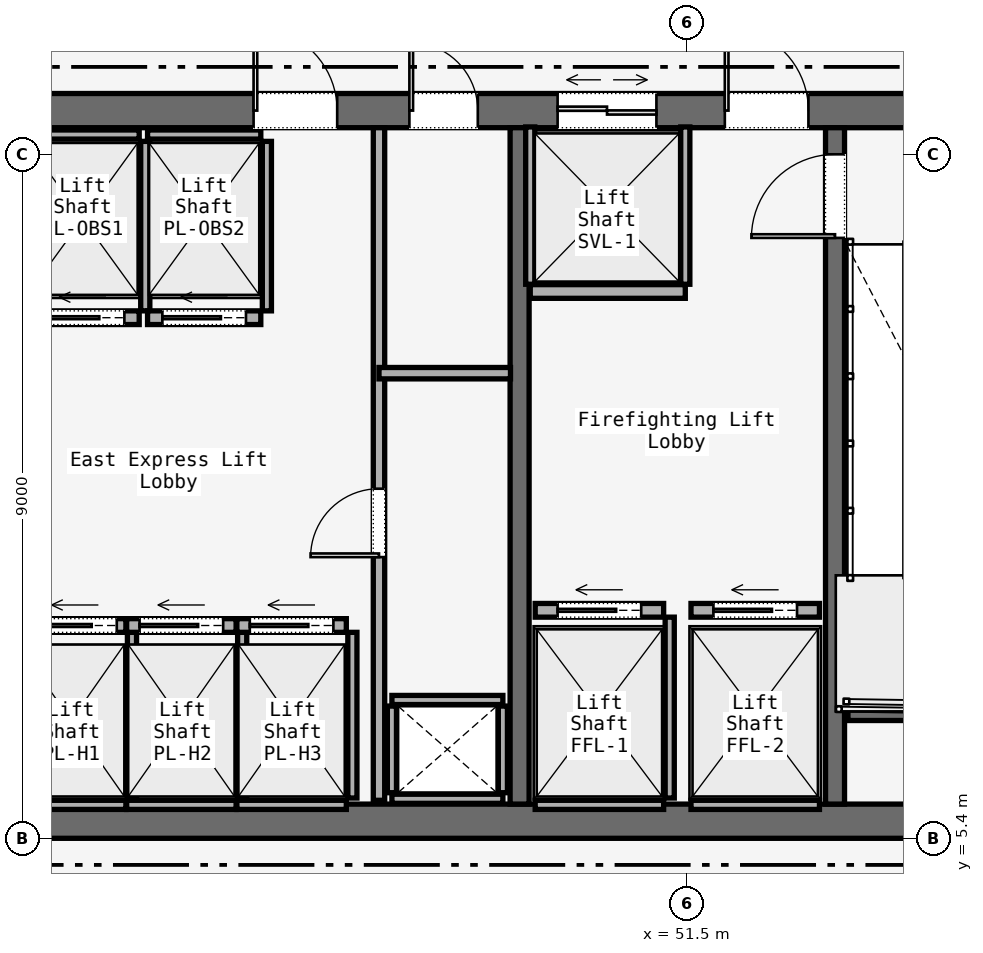
"""IFC4 building model, lengths in metres.
Left out: names, types, materials, properties, quantities, classifications, styles, units other than length and angle.
Written with IfcOpenShell. Run it as: python <this file> out.ifc"""

import sys

from ifc_helpers import new_model, si_unit, direction, frame, frame_2d, origin, place, context, subcontext, project, spatial, rectangle, extrude, element, fill, save


model = new_model("IFC4")
c1 = context("Model", 3, precision=1e-05, world=origin(), true_north=direction((0.0, 1.0)))
c2 = subcontext(c1, "Body", "Model", "MODEL_VIEW")
j1 = project(units=[si_unit("LENGTHUNIT", "METRE"), si_unit("PLANEANGLEUNIT", "RADIAN")], contexts=[c1])
p1 = place(None, origin())
s1 = spatial("IfcSite", under=j1, at=p1, CompositionType="ELEMENT")
p2 = place(p1, origin())
s2 = spatial("IfcBuilding", under=s1, at=p2, CompositionType="ELEMENT")
p3 = place(p2, origin())
s3 = spatial("IfcBuildingStorey", under=s2, at=p3, CompositionType="ELEMENT", Elevation=0.0)
p4 = place(p3, frame((26.45, 14.975, 0.0), z_axis=(0.0, 0.0, 1.0), x_axis=(1.0, 0.0, 0.0)))
e1 = element("IfcWall", 1, at=p4, inside=s3, PredefinedType="SOLIDWALL", context=c2, shape_type="SweptSolid", body=[
    extrude(rectangle(XDim=31.1, YDim=0.45, at=frame_2d((15.55, 0.0))), origin(), (0.0, 0.0, 1.0), 5.7),
])
p5 = place(p4, frame((1.65, 0.0, 0.0)))
e2 = element("IfcOpeningElement", 2, at=p5, cuts=e1, PredefinedType="OPENING", context=c2, shape_type="SweptSolid", body=[
    extrude(rectangle(XDim=1.1, YDim=2.2, at=frame_2d((0.55, 1.1))), frame((0.0, 0.225, 0.0), z_axis=(0.0, -1.0, 0.0), x_axis=(1.0, 0.0, 0.0)), (0.0, 0.0, 1.0), 0.45),
])
p6 = place(p4, frame((13.65, 0.0, 0.0)))
e3 = element("IfcOpeningElement", 3, at=p6, cuts=e1, PredefinedType="OPENING", context=c2, shape_type="SweptSolid", body=[
    extrude(rectangle(XDim=1.1, YDim=2.2, at=frame_2d((0.55, 1.1))), frame((0.0, 0.225, 0.0), z_axis=(0.0, -1.0, 0.0), x_axis=(1.0, 0.0, 0.0)), (0.0, 0.0, 1.0), 0.45),
])
p7 = place(p4, frame((25.55, 0.0, 0.0)))
e4 = element("IfcOpeningElement", 4, at=p7, cuts=e1, PredefinedType="OPENING", context=c2, shape_type="SweptSolid", body=[
    extrude(rectangle(XDim=1.1, YDim=2.2, at=frame_2d((0.55, 1.1))), frame((0.0, 0.225, 0.0), z_axis=(0.0, -1.0, 0.0), x_axis=(1.0, 0.0, 0.0)), (0.0, 0.0, 1.0), 0.45),
])
p8 = place(p4, frame((10.7, 0.0, 0.0)))
e5 = element("IfcOpeningElement", 5, at=p8, cuts=e1, PredefinedType="OPENING", context=c2, shape_type="SweptSolid", body=[
    extrude(rectangle(XDim=1.4, YDim=2.2, at=frame_2d((0.7, 1.1))), frame((0.0, 0.225, 0.0), z_axis=(0.0, -1.0, 0.0), x_axis=(1.0, 0.0, 0.0)), (0.0, 0.0, 1.0), 0.45),
])
p9 = place(p4, frame((19.35, 0.0, 0.0)))
e6 = element("IfcOpeningElement", 6, at=p9, cuts=e1, PredefinedType="OPENING", context=c2, shape_type="SweptSolid", body=[
    extrude(rectangle(XDim=1.1, YDim=2.2, at=frame_2d((0.55, 1.1))), frame((0.0, 0.225, 0.0), z_axis=(0.0, -1.0, 0.0), x_axis=(1.0, 0.0, 0.0)), (0.0, 0.0, 1.0), 0.45),
])
p10 = place(p4, frame((21.4, 0.0, 0.0)))
e7 = element("IfcOpeningElement", 7, at=p10, cuts=e1, PredefinedType="OPENING", context=c2, shape_type="SweptSolid", body=[
    extrude(rectangle(XDim=0.9, YDim=2.1, at=frame_2d((0.45, 1.05))), frame((0.0, 0.225, 0.0), z_axis=(0.0, -1.0, 0.0), x_axis=(1.0, 0.0, 0.0)), (0.0, 0.0, 1.0), 0.45),
])
p11 = place(p4, frame((23.35, 0.0, 0.0)))
e8 = element("IfcOpeningElement", 8, at=p11, cuts=e1, PredefinedType="OPENING", context=c2, shape_type="SweptSolid", body=[
    extrude(rectangle(XDim=1.3, YDim=2.3, at=frame_2d((0.65, 1.15))), frame((0.0, 0.225, 0.0), z_axis=(0.0, -1.0, 0.0), x_axis=(1.0, 0.0, 0.0)), (0.0, 0.0, 1.0), 0.45),
])
p12 = place(p3, frame((26.45, 5.625, 0.0), z_axis=(0.0, 0.0, 1.0), x_axis=(1.0, 0.0, 0.0)))
e9 = element("IfcWall", 9, at=p12, inside=s3, PredefinedType="SOLIDWALL", context=c2, shape_type="SweptSolid", body=[
    extrude(rectangle(XDim=31.1, YDim=0.45, at=frame_2d((15.55, 0.0))), origin(), (0.0, 0.0, 1.0), 5.7),
])
p13 = place(p3, frame((49.3, 5.85, 0.0), z_axis=(0.0, 0.0, 1.0), x_axis=(0.0, 1.0, 0.0)))
e10 = element("IfcWall", 10, at=p13, inside=s3, PredefinedType="SOLIDWALL", context=c2, shape_type="SweptSolid", body=[
    extrude(rectangle(XDim=8.9, YDim=0.25, at=frame_2d((4.45, 0.0))), origin(), (0.0, 0.0, 1.0), 5.7),
])
p14 = place(p3, frame((53.45, 5.85, 0.0), z_axis=(0.0, 0.0, 1.0), x_axis=(0.0, 1.0, 0.0)))
e11 = element("IfcWall", 11, at=p14, inside=s3, PredefinedType="SOLIDWALL", context=c2, shape_type="SweptSolid", body=[
    extrude(rectangle(XDim=8.9, YDim=0.25, at=frame_2d((4.45, 0.0))), origin(), (0.0, 0.0, 1.0), 5.7),
])
p15 = place(p14, frame((7.45, 0.0, 0.0)))
e12 = element("IfcOpeningElement", 12, at=p15, cuts=e11, PredefinedType="OPENING", context=c2, shape_type="SweptSolid", body=[
    extrude(rectangle(XDim=1.1, YDim=2.2, at=frame_2d((0.55, 1.1))), frame((0.0, 0.125, 0.0), z_axis=(0.0, -1.0, 0.0), x_axis=(1.0, 0.0, 0.0)), (0.0, 0.0, 1.0), 0.25),
])
p16 = place(p3, frame((53.62, 7.05, 0.0), z_axis=(0.0, 0.0, 1.0), x_axis=(1.0, 0.0, 0.0)))
e13 = element("IfcWall", 13, at=p16, inside=s3, PredefinedType="SOLIDWALL", context=c2, shape_type="SweptSolid", body=[
    extrude(rectangle(XDim=3.115, YDim=0.2, at=frame_2d((1.558, 0.0))), origin(), (0.0, 0.0, 1.0), 6.0),
])
for number, where, z_axis, x_axis in (
    (14, (47.62, 5.92, 0.0), (0.0, 0.0, 1.0), (1.0, 0.0, 0.0)),
    (15, (47.62, 7.22, 0.0), (0.0, 0.0, 1.0), (1.0, 0.0, 0.0)),
):
    element("IfcWall", number, at=place(p3, frame(where, z_axis=z_axis, x_axis=x_axis)), inside=s3, PredefinedType="SOLIDWALL", context=c2, shape_type="SweptSolid", body=[
        extrude(rectangle(XDim=1.46, YDim=0.12, at=frame_2d((0.73, 0.0))), origin(), (0.0, 0.0, 1.0), 3.6),
    ])
for number, where, z_axis, x_axis in (
    (16, (47.62, 6.0, 0.0), (0.0, 0.0, 1.0), (0.0, 1.0, 0.0)),
    (17, (49.08, 6.0, 0.0), (0.0, 0.0, 1.0), (0.0, 1.0, 0.0)),
):
    element("IfcWall", number, at=place(p3, frame(where, z_axis=z_axis, x_axis=x_axis)), inside=s3, PredefinedType="SOLIDWALL", context=c2, shape_type="SweptSolid", body=[
        extrude(rectangle(XDim=1.14, YDim=0.12, at=frame_2d((0.57, 0.0))), origin(), (0.0, 0.0, 1.0), 3.6),
    ])
p17 = place(p3, frame((47.45, 5.9, 0.0), z_axis=(0.0, 0.0, 1.0), x_axis=(0.0, 1.0, 0.0)))
e18 = element("IfcWall", 18, at=p17, inside=s3, PredefinedType="PARTITIONING", context=c2, shape_type="SweptSolid", body=[
    extrude(rectangle(XDim=8.85, YDim=0.15, at=frame_2d((4.425, 0.0))), origin(), (0.0, 0.0, 1.0), 3.6),
])
p18 = place(p17, frame((3.2, 0.0, 0.0)))
e19 = element("IfcOpeningElement", 19, at=p18, cuts=e18, PredefinedType="OPENING", context=c2, shape_type="SweptSolid", body=[
    extrude(rectangle(XDim=0.9, YDim=2.1, at=frame_2d((0.45, 1.05))), frame((0.0, 0.075, 0.0), z_axis=(0.0, -1.0, 0.0), x_axis=(1.0, 0.0, 0.0)), (0.0, 0.0, 1.0), 0.15),
])
p19 = place(p3, frame((47.45, 11.52, 0.0), z_axis=(0.0, 0.0, 1.0), x_axis=(1.0, 0.0, 0.0)))
e20 = element("IfcWall", 20, at=p19, inside=s3, PredefinedType="PARTITIONING", context=c2, shape_type="SweptSolid", body=[
    extrude(rectangle(XDim=1.73, YDim=0.15, at=frame_2d((0.865, 0.0))), origin(), (0.0, 0.0, 1.0), 3.6),
])
p20 = place(p3, frame((42.78, 8.2, 0.0), z_axis=(0.0, 0.0, 1.0), x_axis=(1.0, 0.0, 0.0)))
e21 = element("IfcWall", 21, at=p20, inside=s3, PredefinedType="SOLIDWALL", context=c2, shape_type="SweptSolid", body=[
    extrude(rectangle(XDim=1.34, YDim=0.18, at=frame_2d((0.67, 0.0))), origin(), (0.0, 0.0, 1.0), 3.6),
])
p21 = place(p20, frame((0.12, 0.0, 0.0)))
e22 = element("IfcOpeningElement", 22, at=p21, cuts=e21, PredefinedType="OPENING", context=c2, shape_type="SweptSolid", body=[
    extrude(rectangle(XDim=1.1, YDim=2.2, at=frame_2d((0.55, 1.1))), frame((0.0, 0.09, 0.0), z_axis=(0.0, -1.0, 0.0), x_axis=(1.0, 0.0, 0.0)), (0.0, 0.0, 1.0), 0.18),
])
p22 = place(p3, frame((42.78, 5.84, 0.0), z_axis=(0.0, 0.0, 1.0), x_axis=(1.0, 0.0, 0.0)))
e23 = element("IfcWall", 23, at=p22, inside=s3, PredefinedType="SOLIDWALL", context=c2, shape_type="SweptSolid", body=[
    extrude(rectangle(XDim=1.34, YDim=0.12, at=frame_2d((0.67, 0.0))), origin(), (0.0, 0.0, 1.0), 3.6),
])
p23 = place(p3, frame((44.2, 5.93, 0.0), z_axis=(0.0, 0.0, 1.0), x_axis=(0.0, 1.0, 0.0)))
e24 = element("IfcWall", 24, at=p23, inside=s3, PredefinedType="SOLIDWALL", context=c2, shape_type="SweptSolid", body=[
    extrude(rectangle(XDim=2.18, YDim=0.12, at=frame_2d((1.09, 0.0))), origin(), (0.0, 0.0, 1.0), 3.6),
])
p24 = place(p3, frame((44.13, 8.2, 0.0), z_axis=(0.0, 0.0, 1.0), x_axis=(1.0, 0.0, 0.0)))
e25 = element("IfcWall", 25, at=p24, inside=s3, PredefinedType="SOLIDWALL", context=c2, shape_type="SweptSolid", body=[
    extrude(rectangle(XDim=1.44, YDim=0.18, at=frame_2d((0.72, 0.0))), origin(), (0.0, 0.0, 1.0), 3.6),
])
p25 = place(p24, frame((0.17, 0.0, 0.0)))
e26 = element("IfcOpeningElement", 26, at=p25, cuts=e25, PredefinedType="OPENING", context=c2, shape_type="SweptSolid", body=[
    extrude(rectangle(XDim=1.1, YDim=2.2, at=frame_2d((0.55, 1.1))), frame((0.0, 0.09, 0.0), z_axis=(0.0, -1.0, 0.0), x_axis=(1.0, 0.0, 0.0)), (0.0, 0.0, 1.0), 0.18),
])
p26 = place(p3, frame((44.13, 5.84, 0.0), z_axis=(0.0, 0.0, 1.0), x_axis=(1.0, 0.0, 0.0)))
e27 = element("IfcWall", 27, at=p26, inside=s3, PredefinedType="SOLIDWALL", context=c2, shape_type="SweptSolid", body=[
    extrude(rectangle(XDim=1.44, YDim=0.12, at=frame_2d((0.72, 0.0))), origin(), (0.0, 0.0, 1.0), 3.6),
])
p27 = place(p3, frame((45.65, 5.93, 0.0), z_axis=(0.0, 0.0, 1.0), x_axis=(0.0, 1.0, 0.0)))
e28 = element("IfcWall", 28, at=p27, inside=s3, PredefinedType="SOLIDWALL", context=c2, shape_type="SweptSolid", body=[
    extrude(rectangle(XDim=2.18, YDim=0.12, at=frame_2d((1.09, 0.0))), origin(), (0.0, 0.0, 1.0), 3.6),
])
p28 = place(p3, frame((45.58, 8.2, 0.0), z_axis=(0.0, 0.0, 1.0), x_axis=(1.0, 0.0, 0.0)))
e29 = element("IfcWall", 29, at=p28, inside=s3, PredefinedType="SOLIDWALL", context=c2, shape_type="SweptSolid", body=[
    extrude(rectangle(XDim=1.44, YDim=0.18, at=frame_2d((0.72, 0.0))), origin(), (0.0, 0.0, 1.0), 3.6),
])
p29 = place(p28, frame((0.17, 0.0, 0.0)))
e30 = element("IfcOpeningElement", 30, at=p29, cuts=e29, PredefinedType="OPENING", context=c2, shape_type="SweptSolid", body=[
    extrude(rectangle(XDim=1.1, YDim=2.2, at=frame_2d((0.55, 1.1))), frame((0.0, 0.09, 0.0), z_axis=(0.0, -1.0, 0.0), x_axis=(1.0, 0.0, 0.0)), (0.0, 0.0, 1.0), 0.18),
])
p30 = place(p3, frame((45.58, 5.84, 0.0), z_axis=(0.0, 0.0, 1.0), x_axis=(1.0, 0.0, 0.0)))
e31 = element("IfcWall", 31, at=p30, inside=s3, PredefinedType="SOLIDWALL", context=c2, shape_type="SweptSolid", body=[
    extrude(rectangle(XDim=1.44, YDim=0.12, at=frame_2d((0.72, 0.0))), origin(), (0.0, 0.0, 1.0), 3.6),
])
p31 = place(p3, frame((47.1, 5.93, 0.0), z_axis=(0.0, 0.0, 1.0), x_axis=(0.0, 1.0, 0.0)))
e32 = element("IfcWall", 32, at=p31, inside=s3, PredefinedType="SOLIDWALL", context=c2, shape_type="SweptSolid", body=[
    extrude(rectangle(XDim=2.18, YDim=0.12, at=frame_2d((1.09, 0.0))), origin(), (0.0, 0.0, 1.0), 3.6),
])
p32 = place(p3, frame((42.805, 12.25, 0.0), z_axis=(0.0, 0.0, 1.0), x_axis=(1.0, 0.0, 0.0)))
e33 = element("IfcWall", 33, at=p32, inside=s3, PredefinedType="SOLIDWALL", context=c2, shape_type="SweptSolid", body=[
    extrude(rectangle(XDim=1.49, YDim=0.18, at=frame_2d((0.745, 0.0))), origin(), (0.0, 0.0, 1.0), 3.6),
])
p33 = place(p32, frame((0.195, 0.0, 0.0)))
e34 = element("IfcOpeningElement", 34, at=p33, cuts=e33, PredefinedType="OPENING", context=c2, shape_type="SweptSolid", body=[
    extrude(rectangle(XDim=1.1, YDim=2.2, at=frame_2d((0.55, 1.1))), frame((0.0, 0.09, 0.0), z_axis=(0.0, -1.0, 0.0), x_axis=(1.0, 0.0, 0.0)), (0.0, 0.0, 1.0), 0.18),
])
p34 = place(p3, frame((42.805, 14.66, 0.0), z_axis=(0.0, 0.0, 1.0), x_axis=(1.0, 0.0, 0.0)))
e35 = element("IfcWall", 35, at=p34, inside=s3, PredefinedType="SOLIDWALL", context=c2, shape_type="SweptSolid", body=[
    extrude(rectangle(XDim=1.49, YDim=0.12, at=frame_2d((0.745, 0.0))), origin(), (0.0, 0.0, 1.0), 3.6),
])
p35 = place(p3, frame((44.375, 12.34, 0.0), z_axis=(0.0, 0.0, 1.0), x_axis=(0.0, 1.0, 0.0)))
e36 = element("IfcWall", 36, at=p35, inside=s3, PredefinedType="SOLIDWALL", context=c2, shape_type="SweptSolid", body=[
    extrude(rectangle(XDim=2.23, YDim=0.12, at=frame_2d((1.115, 0.0))), origin(), (0.0, 0.0, 1.0), 3.6),
])
p36 = place(p3, frame((44.405, 12.25, 0.0), z_axis=(0.0, 0.0, 1.0), x_axis=(1.0, 0.0, 0.0)))
e37 = element("IfcWall", 37, at=p36, inside=s3, PredefinedType="SOLIDWALL", context=c2, shape_type="SweptSolid", body=[
    extrude(rectangle(XDim=1.49, YDim=0.18, at=frame_2d((0.745, 0.0))), origin(), (0.0, 0.0, 1.0), 3.6),
])
p37 = place(p36, frame((0.195, 0.0, 0.0)))
e38 = element("IfcOpeningElement", 38, at=p37, cuts=e37, PredefinedType="OPENING", context=c2, shape_type="SweptSolid", body=[
    extrude(rectangle(XDim=1.1, YDim=2.2, at=frame_2d((0.55, 1.1))), frame((0.0, 0.09, 0.0), z_axis=(0.0, -1.0, 0.0), x_axis=(1.0, 0.0, 0.0)), (0.0, 0.0, 1.0), 0.18),
])
p38 = place(p3, frame((44.405, 14.66, 0.0), z_axis=(0.0, 0.0, 1.0), x_axis=(1.0, 0.0, 0.0)))
e39 = element("IfcWall", 39, at=p38, inside=s3, PredefinedType="SOLIDWALL", context=c2, shape_type="SweptSolid", body=[
    extrude(rectangle(XDim=1.49, YDim=0.12, at=frame_2d((0.745, 0.0))), origin(), (0.0, 0.0, 1.0), 3.6),
])
p39 = place(p3, frame((45.975, 12.34, 0.0), z_axis=(0.0, 0.0, 1.0), x_axis=(0.0, 1.0, 0.0)))
e40 = element("IfcWall", 40, at=p39, inside=s3, PredefinedType="SOLIDWALL", context=c2, shape_type="SweptSolid", body=[
    extrude(rectangle(XDim=2.23, YDim=0.12, at=frame_2d((1.115, 0.0))), origin(), (0.0, 0.0, 1.0), 3.6),
])
p40 = place(p3, frame((49.505, 8.4, 0.0), z_axis=(0.0, 0.0, 1.0), x_axis=(1.0, 0.0, 0.0)))
e41 = element("IfcWall", 41, at=p40, inside=s3, PredefinedType="SOLIDWALL", context=c2, shape_type="SweptSolid", body=[
    extrude(rectangle(XDim=1.69, YDim=0.18, at=frame_2d((0.845, 0.0))), origin(), (0.0, 0.0, 1.0), 3.6),
])
p41 = place(p40, frame((0.295, 0.0, 0.0)))
e42 = element("IfcOpeningElement", 42, at=p41, cuts=e41, PredefinedType="OPENING", context=c2, shape_type="SweptSolid", body=[
    extrude(rectangle(XDim=1.1, YDim=2.2, at=frame_2d((0.55, 1.1))), frame((0.0, 0.09, 0.0), z_axis=(0.0, -1.0, 0.0), x_axis=(1.0, 0.0, 0.0)), (0.0, 0.0, 1.0), 0.18),
])
p42 = place(p3, frame((49.505, 5.84, 0.0), z_axis=(0.0, 0.0, 1.0), x_axis=(1.0, 0.0, 0.0)))
e43 = element("IfcWall", 43, at=p42, inside=s3, PredefinedType="SOLIDWALL", context=c2, shape_type="SweptSolid", body=[
    extrude(rectangle(XDim=1.69, YDim=0.12, at=frame_2d((0.845, 0.0))), origin(), (0.0, 0.0, 1.0), 3.6),
])
p43 = place(p3, frame((51.275, 5.93, 0.0), z_axis=(0.0, 0.0, 1.0), x_axis=(0.0, 1.0, 0.0)))
e44 = element("IfcWall", 44, at=p43, inside=s3, PredefinedType="SOLIDWALL", context=c2, shape_type="SweptSolid", body=[
    extrude(rectangle(XDim=2.38, YDim=0.12, at=frame_2d((1.19, 0.0))), origin(), (0.0, 0.0, 1.0), 3.6),
])
p44 = place(p3, frame((51.555, 8.4, 0.0), z_axis=(0.0, 0.0, 1.0), x_axis=(1.0, 0.0, 0.0)))
e45 = element("IfcWall", 45, at=p44, inside=s3, PredefinedType="SOLIDWALL", context=c2, shape_type="SweptSolid", body=[
    extrude(rectangle(XDim=1.69, YDim=0.18, at=frame_2d((0.845, 0.0))), origin(), (0.0, 0.0, 1.0), 3.6),
])
p45 = place(p44, frame((0.295, 0.0, 0.0)))
e46 = element("IfcOpeningElement", 46, at=p45, cuts=e45, PredefinedType="OPENING", context=c2, shape_type="SweptSolid", body=[
    extrude(rectangle(XDim=1.1, YDim=2.2, at=frame_2d((0.55, 1.1))), frame((0.0, 0.09, 0.0), z_axis=(0.0, -1.0, 0.0), x_axis=(1.0, 0.0, 0.0)), (0.0, 0.0, 1.0), 0.18),
])
p46 = place(p3, frame((51.555, 5.84, 0.0), z_axis=(0.0, 0.0, 1.0), x_axis=(1.0, 0.0, 0.0)))
e47 = element("IfcWall", 47, at=p46, inside=s3, PredefinedType="SOLIDWALL", context=c2, shape_type="SweptSolid", body=[
    extrude(rectangle(XDim=1.69, YDim=0.12, at=frame_2d((0.845, 0.0))), origin(), (0.0, 0.0, 1.0), 3.6),
])
p47 = place(p3, frame((49.44, 12.595, 0.0), z_axis=(0.0, 0.0, 1.0), x_axis=(1.0, 0.0, 0.0)))
e48 = element("IfcWall", 48, at=p47, inside=s3, PredefinedType="SOLIDWALL", context=c2, shape_type="SweptSolid", body=[
    extrude(rectangle(XDim=2.04, YDim=0.18, at=frame_2d((1.02, 0.0))), origin(), (0.0, 0.0, 1.0), 3.6),
])
for number, where, z_axis, x_axis in (
    (49, (49.44, 12.69, 0.0), (0.0, 0.0, 1.0), (0.0, 1.0, 0.0)),
    (50, (51.48, 12.69, 0.0), (0.0, 0.0, 1.0), (0.0, 1.0, 0.0)),
):
    element("IfcWall", number, at=place(p3, frame(where, z_axis=z_axis, x_axis=x_axis)), inside=s3, PredefinedType="SOLIDWALL", context=c2, shape_type="SweptSolid", body=[
        extrude(rectangle(XDim=2.07, YDim=0.12, at=frame_2d((1.035, 0.0))), origin(), (0.0, 0.0, 1.0), 3.6),
    ])
p48 = place(p7, origin())
e51 = element("IfcDoor", 51, at=p48, inside=s3, OperationType="SINGLE_SWING_RIGHT", PredefinedType="DOOR", context=c2, shape_type="SweptSolid", body=[
    extrude(rectangle(XDim=1.1, YDim=2.2, at=frame_2d((0.55, 1.1))), frame((0.0, 0.025, 0.0), z_axis=(0.0, -1.0, 0.0), x_axis=(1.0, 0.0, 0.0)), (0.0, 0.0, 1.0), 0.05),
])
fill(e4, e51)
p49 = place(p9, origin())
e52 = element("IfcDoor", 52, at=p49, inside=s3, OperationType="SINGLE_SWING_LEFT", PredefinedType="DOOR", context=c2, shape_type="SweptSolid", body=[
    extrude(rectangle(XDim=1.1, YDim=2.2, at=frame_2d((0.55, 1.1))), frame((0.0, 0.025, 0.0), z_axis=(0.0, -1.0, 0.0), x_axis=(1.0, 0.0, 0.0)), (0.0, 0.0, 1.0), 0.05),
])
fill(e6, e52)
p50 = place(p10, origin())
e53 = element("IfcDoor", 53, at=p50, inside=s3, OperationType="SINGLE_SWING_LEFT", PredefinedType="DOOR", context=c2, shape_type="SweptSolid", body=[
    extrude(rectangle(XDim=0.9, YDim=2.1, at=frame_2d((0.45, 1.05))), frame((0.0, 0.025, 0.0), z_axis=(0.0, -1.0, 0.0), x_axis=(1.0, 0.0, 0.0)), (0.0, 0.0, 1.0), 0.05),
])
fill(e7, e53)
p51 = place(p15, origin())
e54 = element("IfcDoor", 54, at=p51, inside=s3, OperationType="SINGLE_SWING_LEFT", PredefinedType="DOOR", context=c2, shape_type="SweptSolid", body=[
    extrude(rectangle(XDim=1.1, YDim=2.2, at=frame_2d((0.55, 1.1))), frame((0.0, 0.025, 0.0), z_axis=(0.0, -1.0, 0.0), x_axis=(1.0, 0.0, 0.0)), (0.0, 0.0, 1.0), 0.05),
])
fill(e12, e54)
p52 = place(p18, origin())
e55 = element("IfcDoor", 55, at=p52, inside=s3, OperationType="SINGLE_SWING_LEFT", PredefinedType="DOOR", context=c2, shape_type="SweptSolid", body=[
    extrude(rectangle(XDim=0.9, YDim=2.1, at=frame_2d((0.45, 1.05))), frame((0.0, 0.025, 0.0), z_axis=(0.0, -1.0, 0.0), x_axis=(1.0, 0.0, 0.0)), (0.0, 0.0, 1.0), 0.05),
])
fill(e19, e55)
p53 = place(p21, origin())
e56 = element("IfcDoor", 56, at=p53, inside=s3, OperationType="SLIDING_TO_LEFT", PredefinedType="DOOR", context=c2, shape_type="SweptSolid", body=[
    extrude(rectangle(XDim=1.1, YDim=2.2, at=frame_2d((0.55, 1.1))), frame((0.0, 0.025, 0.0), z_axis=(0.0, -1.0, 0.0), x_axis=(1.0, 0.0, 0.0)), (0.0, 0.0, 1.0), 0.05),
])
fill(e22, e56)
p54 = place(p25, origin())
e57 = element("IfcDoor", 57, at=p54, inside=s3, OperationType="SLIDING_TO_LEFT", PredefinedType="DOOR", context=c2, shape_type="SweptSolid", body=[
    extrude(rectangle(XDim=1.1, YDim=2.2, at=frame_2d((0.55, 1.1))), frame((0.0, 0.025, 0.0), z_axis=(0.0, -1.0, 0.0), x_axis=(1.0, 0.0, 0.0)), (0.0, 0.0, 1.0), 0.05),
])
fill(e26, e57)
p55 = place(p29, origin())
e58 = element("IfcDoor", 58, at=p55, inside=s3, OperationType="SLIDING_TO_LEFT", PredefinedType="DOOR", context=c2, shape_type="SweptSolid", body=[
    extrude(rectangle(XDim=1.1, YDim=2.2, at=frame_2d((0.55, 1.1))), frame((0.0, 0.025, 0.0), z_axis=(0.0, -1.0, 0.0), x_axis=(1.0, 0.0, 0.0)), (0.0, 0.0, 1.0), 0.05),
])
fill(e30, e58)
p56 = place(p33, origin())
e59 = element("IfcDoor", 59, at=p56, inside=s3, OperationType="SLIDING_TO_LEFT", PredefinedType="DOOR", context=c2, shape_type="SweptSolid", body=[
    extrude(rectangle(XDim=1.1, YDim=2.2, at=frame_2d((0.55, 1.1))), frame((0.0, 0.025, 0.0), z_axis=(0.0, -1.0, 0.0), x_axis=(1.0, 0.0, 0.0)), (0.0, 0.0, 1.0), 0.05),
])
fill(e34, e59)
p57 = place(p37, origin())
e60 = element("IfcDoor", 60, at=p57, inside=s3, OperationType="SLIDING_TO_LEFT", PredefinedType="DOOR", context=c2, shape_type="SweptSolid", body=[
    extrude(rectangle(XDim=1.1, YDim=2.2, at=frame_2d((0.55, 1.1))), frame((0.0, 0.025, 0.0), z_axis=(0.0, -1.0, 0.0), x_axis=(1.0, 0.0, 0.0)), (0.0, 0.0, 1.0), 0.05),
])
fill(e38, e60)
p58 = place(p41, origin())
e61 = element("IfcDoor", 61, at=p58, inside=s3, OperationType="SLIDING_TO_LEFT", PredefinedType="DOOR", context=c2, shape_type="SweptSolid", body=[
    extrude(rectangle(XDim=1.1, YDim=2.2, at=frame_2d((0.55, 1.1))), frame((0.0, 0.025, 0.0), z_axis=(0.0, -1.0, 0.0), x_axis=(1.0, 0.0, 0.0)), (0.0, 0.0, 1.0), 0.05),
])
fill(e42, e61)
p59 = place(p45, origin())
e62 = element("IfcDoor", 62, at=p59, inside=s3, OperationType="SLIDING_TO_LEFT", PredefinedType="DOOR", context=c2, shape_type="SweptSolid", body=[
    extrude(rectangle(XDim=1.1, YDim=2.2, at=frame_2d((0.55, 1.1))), frame((0.0, 0.025, 0.0), z_axis=(0.0, -1.0, 0.0), x_axis=(1.0, 0.0, 0.0)), (0.0, 0.0, 1.0), 0.05),
])
fill(e46, e62)
p60 = place(p11, origin())
e63 = element("IfcDoor", 63, at=p60, inside=s3, OperationType="DOUBLE_DOOR_SLIDING", PredefinedType="DOOR", context=c2, shape_type="SweptSolid", body=[
    extrude(rectangle(XDim=1.3, YDim=2.3, at=frame_2d((0.65, 1.15))), frame((0.0, 0.025, 0.0), z_axis=(0.0, -1.0, 0.0), x_axis=(1.0, 0.0, 0.0)), (0.0, 0.0, 1.0), 0.05),
])
fill(e8, e63)
save(model, sys.argv[1])
